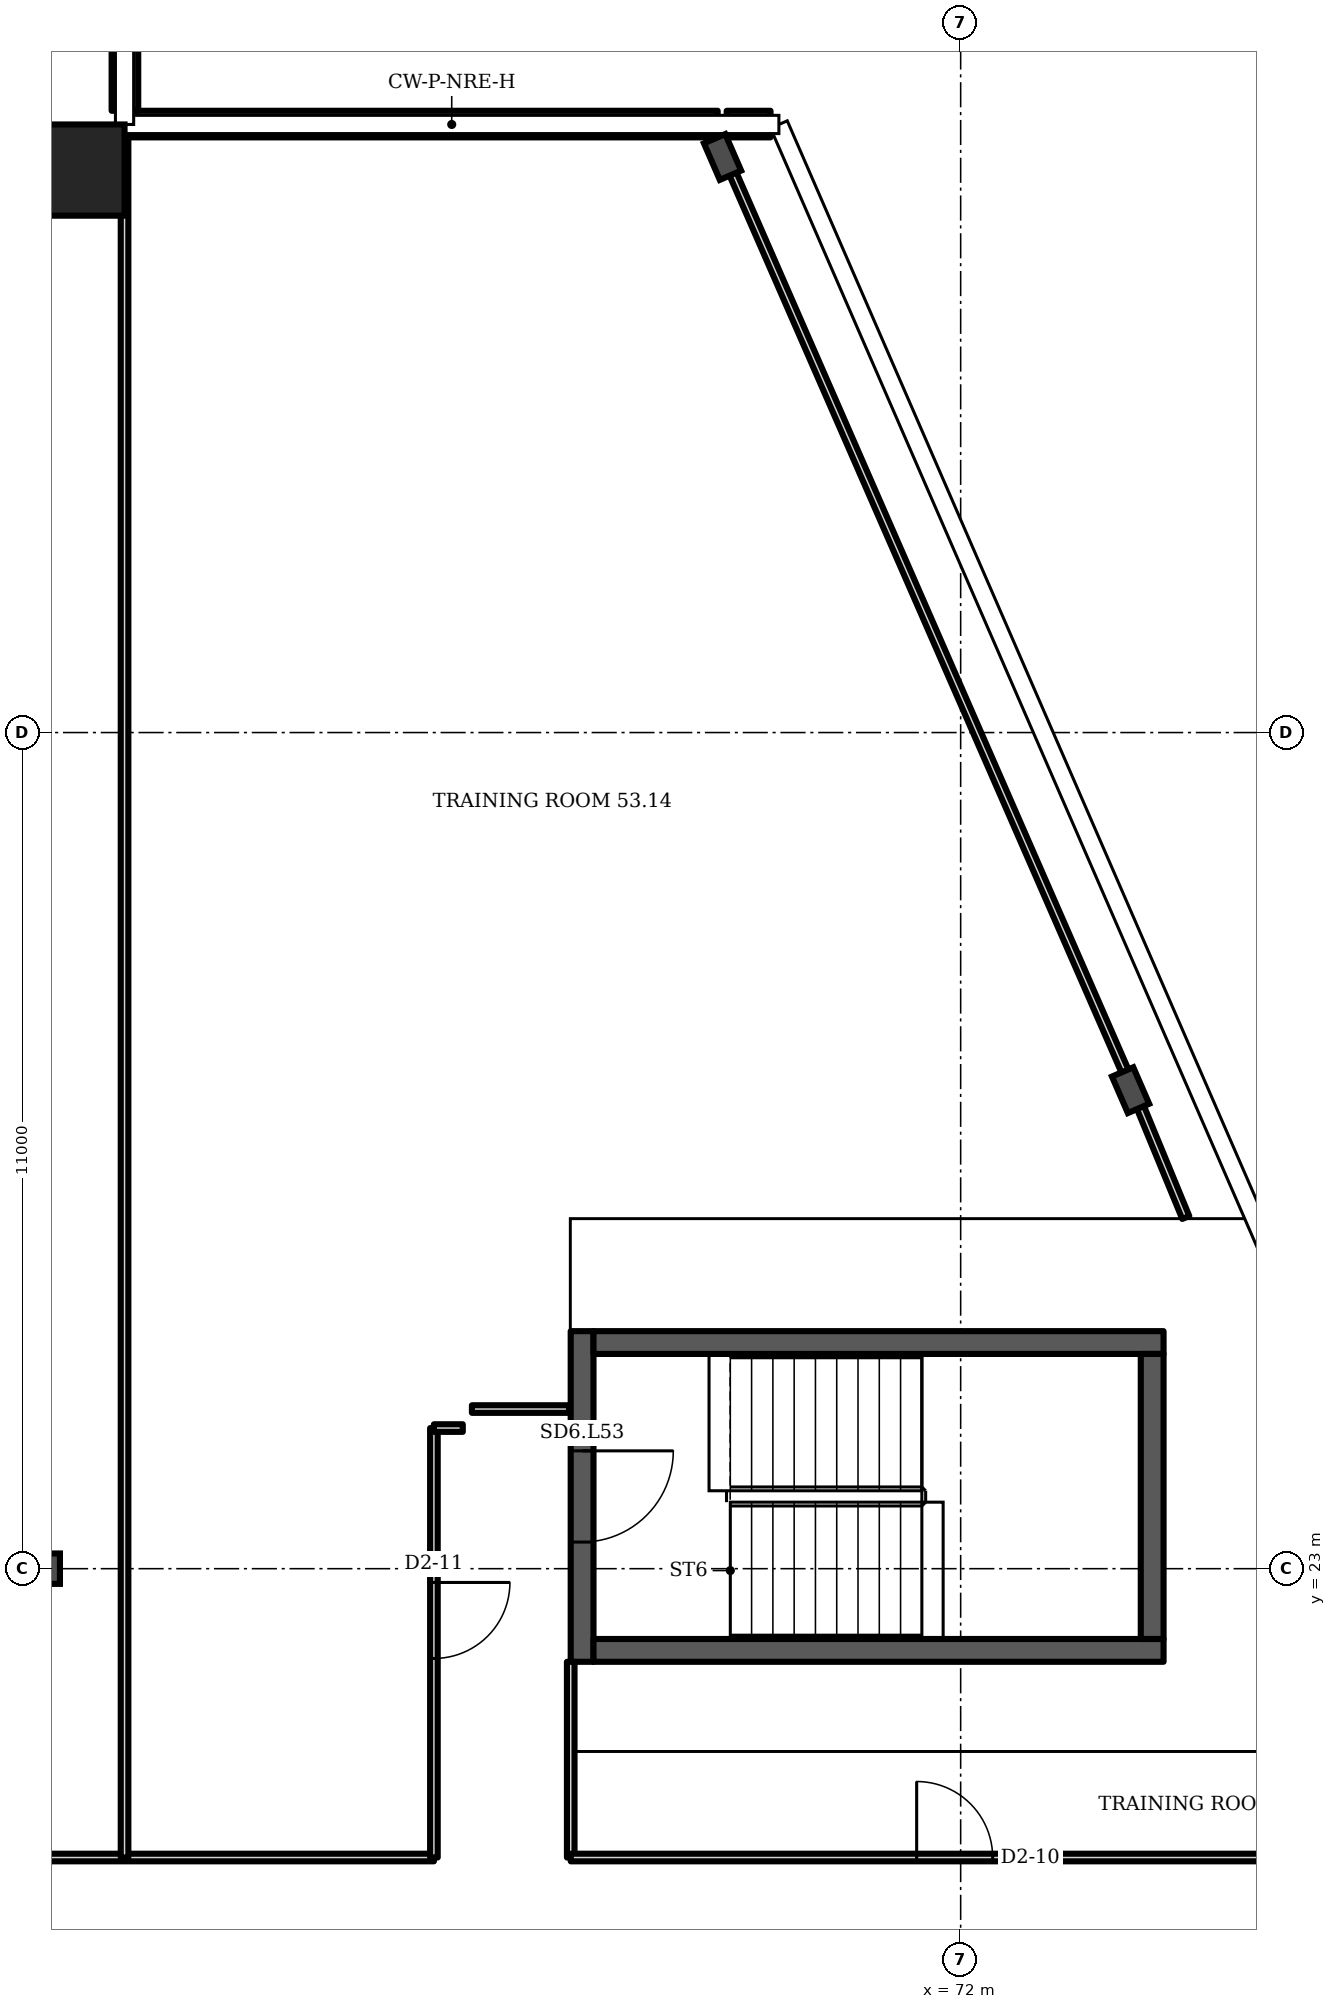
"""IFC4 building model, lengths in metres.
Left out: names, types, materials, properties, quantities, classifications, styles, units other than length and angle.
Written with IfcOpenShell. Run it as: python <this file> out.ifc"""

import sys

from ifc_helpers import new_model, si_unit, direction, frame, frame_2d, origin, origin_2d, place, context, subcontext, project, spatial, rectangle, i_section, extrude, element, fill, save


model = new_model("IFC4")
c1 = context("Model", 3, precision=1e-05, world=origin(), true_north=direction((0.0, 1.0)))
c2 = subcontext(c1, "Body", "Model", "MODEL_VIEW")
j1 = project(units=[si_unit("LENGTHUNIT", "METRE"), si_unit("PLANEANGLEUNIT", "RADIAN")], contexts=[c1])
p1 = place(None, origin())
s1 = spatial("IfcSite", under=j1, at=p1, CompositionType="ELEMENT")
p2 = place(p1, origin())
s2 = spatial("IfcBuilding", under=s1, at=p2, CompositionType="ELEMENT")
p3 = place(p2, frame((0.0, 0.0, 214.3)))
s3 = spatial("IfcBuildingStorey", under=s2, at=p3, CompositionType="ELEMENT", Elevation=214.3)
p4 = place(p3, frame((60.4, 41.4, 0.0), z_axis=(0.0, 0.0, 1.0), x_axis=(1.0, 0.0, 0.0)))
e1 = element("IfcColumn", 1, at=p4, inside=s3, PredefinedType="COLUMN", context=c2, shape_type="SweptSolid", body=[
    extrude(rectangle(XDim=1.2, YDim=1.2, at=origin_2d()), origin(), (0.0, 0.0, 1.0), 3.6),
])
for number, where, z_axis, x_axis in (
    (2, (74.235, 29.295, 0.0), (0.0, 0.0, 1.0), (0.917, 0.399, 0.0)),
    (3, (68.867, 41.572, 0.0), (0.0, 0.0, 1.0), (0.917, 0.399, 0.0)),
):
    element("IfcColumn", number, at=place(p3, frame(where, z_axis=z_axis, x_axis=x_axis)), inside=s3, PredefinedType="COLUMN", context=c2, shape_type="SweptSolid", body=[
        extrude(i_section(OverallWidth=0.306, OverallDepth=0.524, WebThickness=0.021, FlangeThickness=0.04, FilletRadius=0.027, at=origin_2d()), origin(), (0.0, 0.0, 1.0), 3.6),
    ])
p5 = place(p3, frame((60.0, 23.0, 0.0), z_axis=(0.0, 0.0, 1.0), x_axis=(1.0, 0.0, 0.0)))
e4 = element("IfcColumn", 4, at=p5, inside=s3, PredefinedType="COLUMN", context=c2, shape_type="SweptSolid", body=[
    extrude(i_section(OverallWidth=0.3, OverallDepth=0.4, WebThickness=0.013, FlangeThickness=0.024, FilletRadius=0.027, at=origin_2d()), origin(), (0.0, 0.0, 1.0), 3.6),
])
p6 = place(p3, frame((69.499, 42.005, 0.0), z_axis=(0.0, 0.0, 1.0), x_axis=(-1.0, 0.0, 0.0)))
e5 = element("IfcWall", 5, at=p6, inside=s3, PredefinedType="SOLIDWALL", context=c2, shape_type="SweptSolid", body=[
    extrude(rectangle(XDim=0.577, YDim=0.35, at=frame_2d((0.288, 0.0))), origin(), (0.0, 0.0, 1.0), 1.0),
])
p7 = place(p3, frame((68.803, 42.005, 0.0), z_axis=(0.0, 0.0, 1.0), x_axis=(-1.0, 0.0, 0.0)))
e6 = element("IfcWall", 6, at=p7, inside=s3, PredefinedType="SOLIDWALL", context=c2, shape_type="SweptSolid", body=[
    extrude(rectangle(XDim=7.803, YDim=0.35, at=frame_2d((3.902, 0.0))), origin(), (0.0, 0.0, 1.0), 1.0),
])
p8 = place(p3, frame((61.005, 42.18, 0.0), z_axis=(0.0, 0.0, 1.0), x_axis=(0.0, 1.0, 0.0)))
e7 = element("IfcWall", 7, at=p8, inside=s3, PredefinedType="SOLIDWALL", context=c2, shape_type="SweptSolid", body=[
    extrude(rectangle(XDim=5.947, YDim=0.35, at=frame_2d((2.973, 0.0))), origin(), (0.0, 0.0, 1.0), 1.0),
])
p9 = place(p3, frame((67.02, 21.775, 0.0), z_axis=(0.0, 0.0, 1.0), x_axis=(0.0, 1.0, 0.0)))
e8 = element("IfcWall", 8, at=p9, inside=s3, PredefinedType="SHEAR", context=c2, shape_type="SweptSolid", body=[
    extrude(rectangle(XDim=4.35, YDim=0.3, at=frame_2d((2.175, 0.0))), origin(), (0.0, 0.0, 1.0), 3.2),
])
p10 = place(p9, frame((1.575, 0.0, 0.0)))
e9 = element("IfcOpeningElement", 9, at=p10, cuts=e8, PredefinedType="OPENING", context=c2, shape_type="SweptSolid", body=[
    extrude(rectangle(XDim=1.2, YDim=2.1, at=frame_2d((0.6, 1.05))), frame((0.0, 0.16, 0.0), z_axis=(0.0, -1.0, 0.0), x_axis=(1.0, 0.0, 0.0)), (0.0, 0.0, 1.0), 0.32),
])
p11 = place(p3, frame((47.36, 19.2, 0.0), z_axis=(0.0, 0.0, 1.0), x_axis=(1.0, 0.0, 0.0)))
e10 = element("IfcWall", 10, at=p11, inside=s3, PredefinedType="PARTITIONING", context=c2, shape_type="SweptSolid", body=[
    extrude(rectangle(XDim=17.71, YDim=0.1, at=frame_2d((8.855, 0.0))), origin(), (0.0, 0.0, 1.0), 3.2),
])
p12 = place(p3, frame((61.0, 19.2, 0.0), z_axis=(0.0, 0.0, 1.0), x_axis=(0.0, 1.0, 0.0)))
e11 = element("IfcWall", 11, at=p12, inside=s3, PredefinedType="PARTITIONING", context=c2, shape_type="SweptSolid", body=[
    extrude(rectangle(XDim=22.78, YDim=0.1, at=frame_2d((11.39, 0.0))), origin(), (0.0, 0.0, 1.0), 3.2),
])
p13 = place(p3, frame((65.07, 19.2, 0.0), z_axis=(0.0, 0.0, 1.0), x_axis=(0.0, 1.0, 0.0)))
e12 = element("IfcWall", 12, at=p13, inside=s3, PredefinedType="PARTITIONING", context=c2, shape_type="SweptSolid", body=[
    extrude(rectangle(XDim=5.65, YDim=0.1, at=frame_2d((2.825, 0.0))), origin(), (0.0, 0.0, 1.0), 3.2),
])
p14 = place(p13, frame((2.619, 0.0, 0.0)))
e13 = element("IfcOpeningElement", 13, at=p14, cuts=e12, PredefinedType="OPENING", context=c2, shape_type="SweptSolid", body=[
    extrude(rectangle(XDim=1.0, YDim=2.1, at=frame_2d((0.5, 1.05))), frame((0.0, 0.06, 0.0), z_axis=(0.0, -1.0, 0.0), x_axis=(1.0, 0.0, 0.0)), (0.0, 0.0, 1.0), 0.12),
])
p15 = place(p3, frame((65.07, 24.85, 0.0), z_axis=(0.0, 0.0, 1.0), x_axis=(1.0, 0.0, 0.0)))
e14 = element("IfcWall", 14, at=p15, inside=s3, PredefinedType="PARTITIONING", context=c2, shape_type="SweptSolid", body=[
    extrude(rectangle(XDim=0.38, YDim=0.1, at=frame_2d((0.19, 0.0))), origin(), (0.0, 0.0, 1.0), 3.2),
])
p16 = place(p3, frame((65.57, 25.1, 0.0), z_axis=(0.0, 0.0, 1.0), x_axis=(1.0, 0.0, 0.0)))
e15 = element("IfcWall", 15, at=p16, inside=s3, PredefinedType="PARTITIONING", context=c2, shape_type="SweptSolid", body=[
    extrude(rectangle(XDim=1.28, YDim=0.1, at=frame_2d((0.64, 0.0))), origin(), (0.0, 0.0, 1.0), 3.2),
])
p17 = place(p3, frame((66.87, 19.2, 0.0), z_axis=(0.0, 0.0, 1.0), x_axis=(0.0, 1.0, 0.0)))
e16 = element("IfcWall", 16, at=p17, inside=s3, PredefinedType="PARTITIONING", context=c2, shape_type="SweptSolid", body=[
    extrude(rectangle(XDim=2.575, YDim=0.1, at=frame_2d((1.288, 0.0))), origin(), (0.0, 0.0, 1.0), 3.2),
])
p18 = place(p3, frame((66.87, 19.2, 0.0), z_axis=(0.0, 0.0, 1.0), x_axis=(1.0, 0.0, 0.0)))
e17 = element("IfcWall", 17, at=p18, inside=s3, PredefinedType="PARTITIONING", context=c2, shape_type="SweptSolid", body=[
    extrude(rectangle(XDim=11.57, YDim=0.1, at=frame_2d((5.785, 0.0))), origin(), (0.0, 0.0, 1.0), 3.2),
])
p19 = place(p18, frame((4.551, 0.0, 0.0)))
e18 = element("IfcOpeningElement", 18, at=p19, cuts=e17, PredefinedType="OPENING", context=c2, shape_type="SweptSolid", body=[
    extrude(rectangle(XDim=1.0, YDim=2.1, at=frame_2d((0.5, 1.05))), frame((0.0, 0.06, 0.0), z_axis=(0.0, -1.0, 0.0), x_axis=(1.0, 0.0, 0.0)), (0.0, 0.0, 1.0), 0.12),
])
p20 = place(p3, frame((74.265, 29.31, 0.0), z_axis=(0.0, 0.0, 1.0), x_axis=(-0.400401, 0.916335, 0.0)))
e19 = element("IfcWall", 19, at=p20, inside=s3, PredefinedType="PARTITIONING", context=c2, shape_type="SweptSolid", body=[
    extrude(rectangle(XDim=13.795, YDim=0.1, at=frame_2d((6.897, 0.0))), origin(), (0.0, 0.0, 1.0), 2.58),
])
p21 = place(p3, frame((74.962, 27.62, 0.0), z_axis=(0.0, 0.0, 1.0), x_axis=(-0.381293, 0.924452, 0.0)))
e20 = element("IfcWall", 20, at=p21, inside=s3, PredefinedType="PARTITIONING", context=c2, shape_type="SweptSolid", body=[
    extrude(rectangle(XDim=1.828, YDim=0.1, at=frame_2d((0.914, 0.0))), origin(), (0.0, 0.0, 1.0), 2.58),
])
for number, where, z_axis, x_axis in (
    (21, (67.17, 21.925, 0.0), (0.0, 0.0, 1.0), (1.0, 0.0, 0.0)),
    (22, (67.17, 25.975, 0.0), (0.0, 0.0, 1.0), (1.0, 0.0, 0.0)),
):
    element("IfcWall", number, at=place(p3, frame(where, z_axis=z_axis, x_axis=x_axis)), inside=s3, PredefinedType="SHEAR", context=c2, shape_type="SweptSolid", body=[
        extrude(rectangle(XDim=7.5, YDim=0.3, at=frame_2d((3.75, 0.0))), origin(), (0.0, 0.0, 1.0), 3.2),
    ])
p22 = place(p3, frame((74.52, 22.075, 0.0), z_axis=(0.0, 0.0, 1.0), x_axis=(0.0, 1.0, 0.0)))
e23 = element("IfcWall", 23, at=p22, inside=s3, PredefinedType="SHEAR", context=c2, shape_type="SweptSolid", body=[
    extrude(rectangle(XDim=3.75, YDim=0.3, at=frame_2d((1.875, 0.0))), origin(), (0.0, 0.0, 1.0), 3.2),
])
p23 = place(p10, origin())
e24 = element("IfcDoor", 24, at=p23, inside=s3, OperationType="SINGLE_SWING_RIGHT", PredefinedType="DOOR", context=c2, shape_type="SweptSolid", body=[
    extrude(rectangle(XDim=1.2, YDim=2.1, at=frame_2d((0.6, 1.05))), frame((0.0, 0.025, 0.0), z_axis=(0.0, -1.0, 0.0), x_axis=(1.0, 0.0, 0.0)), (0.0, 0.0, 1.0), 0.05),
])
fill(e9, e24)
p24 = place(p19, origin())
e25 = element("IfcDoor", 25, at=p24, inside=s3, OperationType="SINGLE_SWING_LEFT", PredefinedType="DOOR", context=c2, shape_type="SweptSolid", body=[
    extrude(rectangle(XDim=1.0, YDim=2.1, at=frame_2d((0.5, 1.05))), frame((0.0, 0.025, 0.0), z_axis=(0.0, -1.0, 0.0), x_axis=(1.0, 0.0, 0.0)), (0.0, 0.0, 1.0), 0.05),
])
fill(e18, e25)
p25 = place(p14, origin())
e26 = element("IfcDoor", 26, at=p25, inside=s3, OperationType="SINGLE_SWING_RIGHT", PredefinedType="DOOR", context=c2, shape_type="SweptSolid", body=[
    extrude(rectangle(XDim=1.0, YDim=2.1, at=frame_2d((0.5, 1.05))), frame((0.0, 0.025, 0.0), z_axis=(0.0, -1.0, 0.0), x_axis=(1.0, 0.0, 0.0)), (0.0, 0.0, 1.0), 0.05),
])
fill(e13, e26)
save(model, sys.argv[1])
